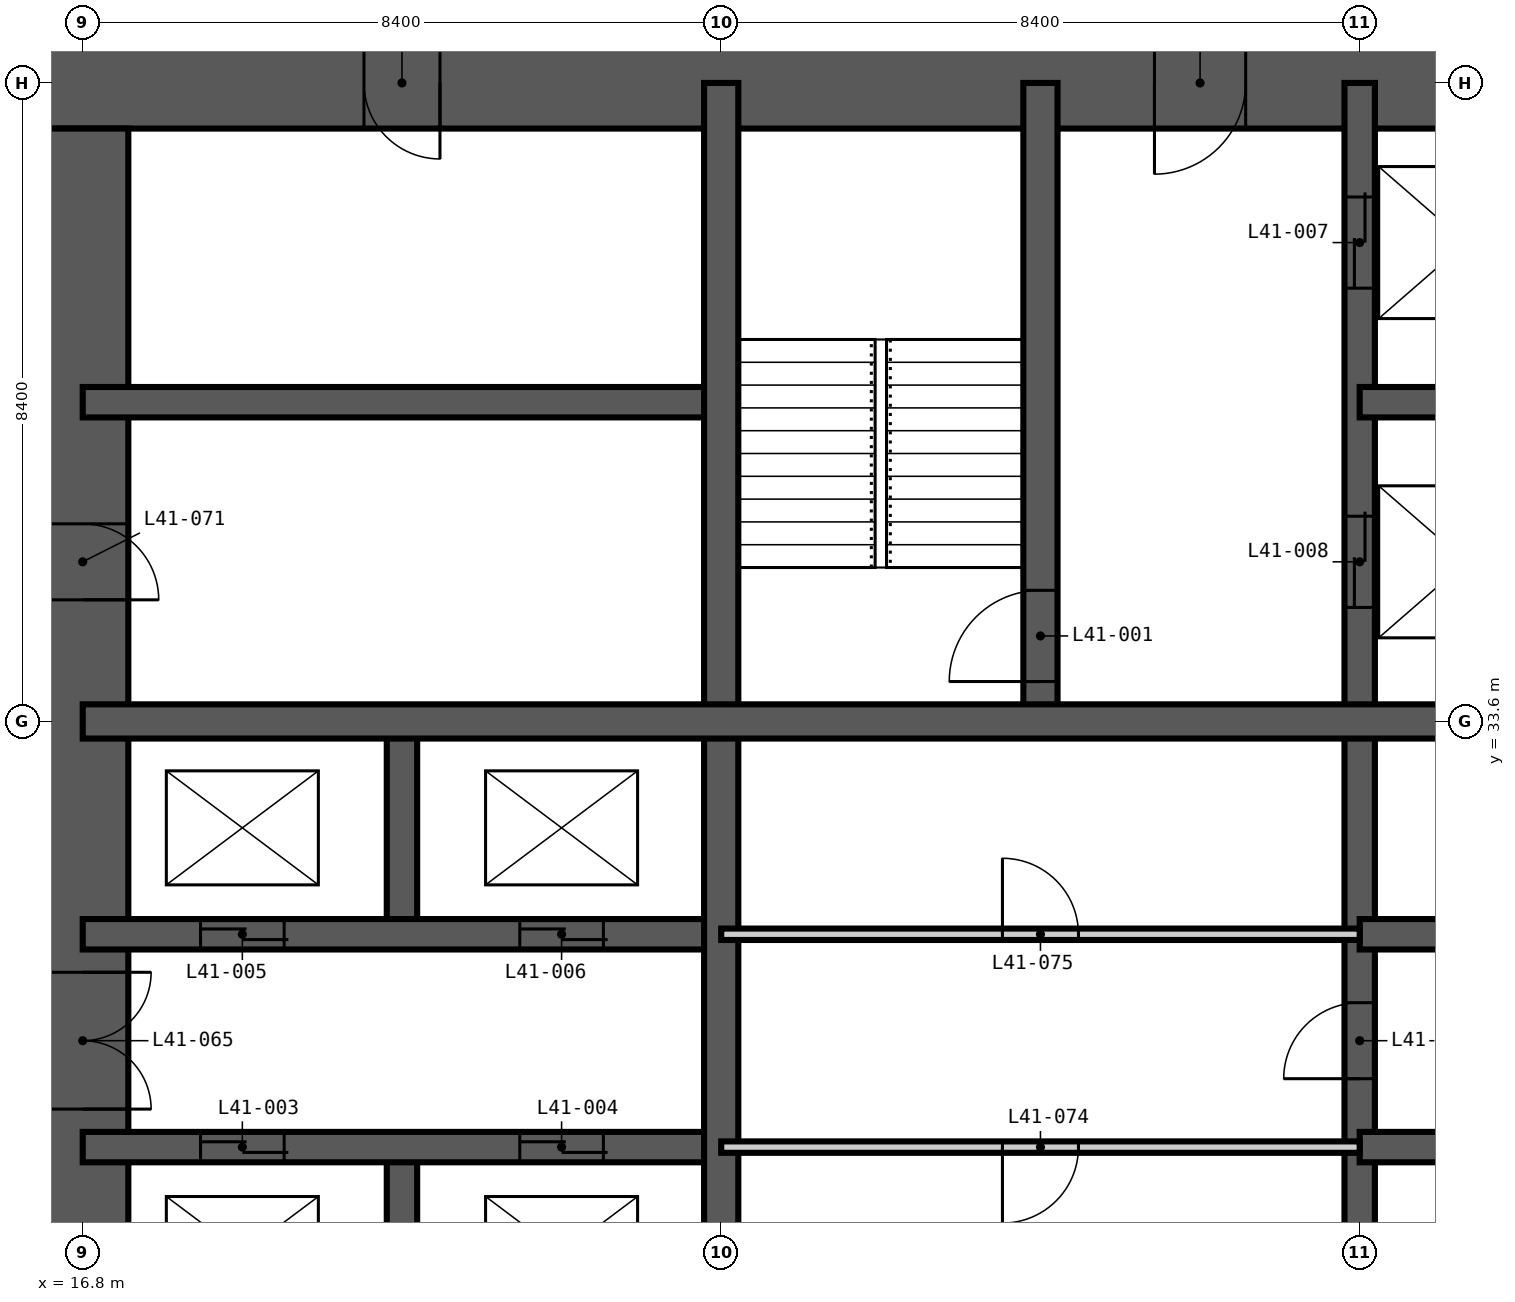
"""IFC4 building model, lengths in metres.
Left out: names, types, materials, properties, quantities, classifications, styles, units other than length and angle.
Written with IfcOpenShell. Run it as: python <this file> out.ifc"""

import sys

from ifc_helpers import new_model, si_unit, direction, frame, frame_2d, origin, place, context, subcontext, project, spatial, rectangle, extrude, element, fill, save


model = new_model("IFC4")
c1 = context("Model", 3, precision=1e-05, world=origin(), true_north=direction((0.0, 1.0)))
c2 = subcontext(c1, "Body", "Model", "MODEL_VIEW")
j1 = project(units=[si_unit("LENGTHUNIT", "METRE"), si_unit("PLANEANGLEUNIT", "RADIAN")], contexts=[c1])
p1 = place(None, origin())
s1 = spatial("IfcSite", under=j1, at=p1, CompositionType="ELEMENT")
p2 = place(p1, origin())
s2 = spatial("IfcBuilding", under=s1, at=p2, CompositionType="ELEMENT")
p3 = place(p2, frame((0.0, 0.0, 162.6)))
s3 = spatial("IfcBuildingStorey", under=s2, at=p3, CompositionType="ELEMENT", Elevation=162.6)
p4 = place(p3, frame((42.6, 42.0, -0.35), z_axis=(0.0, 0.0, 1.0), x_axis=(-1.0, 0.0, 0.0)))
e1 = element("IfcWall", 1, at=p4, inside=s3, PredefinedType="SHEAR", context=c2, shape_type="SweptSolid", body=[
    extrude(rectangle(XDim=26.4, YDim=1.2, at=frame_2d((13.2, 0.0))), origin(), (0.0, 0.0, 1.0), 3.6),
])
p5 = place(p4, frame((21.1, 0.0, 0.35)))
e2 = element("IfcOpeningElement", 2, at=p5, cuts=e1, PredefinedType="OPENING", context=c2, shape_type="SweptSolid", body=[
    extrude(rectangle(XDim=1.0, YDim=2.1, at=frame_2d((0.5, 1.05))), frame((0.0, 0.61, 0.0), z_axis=(0.0, -1.0, 0.0), x_axis=(1.0, 0.0, 0.0)), (0.0, 0.0, 1.0), 1.22),
])
p6 = place(p4, frame((10.5, 0.0, 0.35)))
e3 = element("IfcOpeningElement", 3, at=p6, cuts=e1, PredefinedType="OPENING", context=c2, shape_type="SweptSolid", body=[
    extrude(rectangle(XDim=1.2, YDim=2.2, at=frame_2d((0.6, 1.1))), frame((0.0, 0.61, 0.0), z_axis=(0.0, -1.0, 0.0), x_axis=(1.0, 0.0, 0.0)), (0.0, 0.0, 1.0), 1.22),
])
p7 = place(p3, frame((16.8, 41.4, -0.35), z_axis=(0.0, 0.0, 1.0), x_axis=(0.0, -1.0, 0.0)))
e4 = element("IfcWall", 4, at=p7, inside=s3, PredefinedType="SHEAR", context=c2, shape_type="SweptSolid", body=[
    extrude(rectangle(XDim=24.0, YDim=1.2, at=frame_2d((12.0, 0.0))), origin(), (0.0, 0.0, 1.0), 3.6),
])
p8 = place(p7, frame((11.1, 0.0, 0.35)))
e5 = element("IfcOpeningElement", 5, at=p8, cuts=e4, PredefinedType="OPENING", context=c2, shape_type="SweptSolid", body=[
    extrude(rectangle(XDim=1.8, YDim=2.2, at=frame_2d((0.9, 1.1))), frame((0.0, 0.61, 0.0), z_axis=(0.0, -1.0, 0.0), x_axis=(1.0, 0.0, 0.0)), (0.0, 0.0, 1.0), 1.22),
])
p9 = place(p7, frame((19.9, 0.0, 0.35)))
e6 = element("IfcOpeningElement", 6, at=p9, cuts=e4, PredefinedType="OPENING", context=c2, shape_type="SweptSolid", body=[
    extrude(rectangle(XDim=1.0, YDim=2.1, at=frame_2d((0.5, 1.05))), frame((0.0, 0.61, 0.0), z_axis=(0.0, -1.0, 0.0), x_axis=(1.0, 0.0, 0.0)), (0.0, 0.0, 1.0), 1.22),
])
p10 = place(p7, frame((5.2, 0.0, 0.35)))
e7 = element("IfcOpeningElement", 7, at=p10, cuts=e4, PredefinedType="OPENING", context=c2, shape_type="SweptSolid", body=[
    extrude(rectangle(XDim=1.0, YDim=2.1, at=frame_2d((0.5, 1.05))), frame((0.0, 0.61, 0.0), z_axis=(0.0, -1.0, 0.0), x_axis=(1.0, 0.0, 0.0)), (0.0, 0.0, 1.0), 1.22),
])
p11 = place(p3, frame((21.0, 22.4, -0.35), z_axis=(0.0, 0.0, 1.0), x_axis=(0.0, 1.0, 0.0)))
e8 = element("IfcWall", 8, at=p11, inside=s3, PredefinedType="SHEAR", context=c2, shape_type="SweptSolid", body=[
    extrude(rectangle(XDim=5.6, YDim=0.4, at=frame_2d((2.8, 0.0))), origin(), (0.0, 0.0, 1.0), 3.6),
])
p12 = place(p3, frame((21.0, 30.8, -0.35), z_axis=(0.0, 0.0, 1.0), x_axis=(0.0, 1.0, 0.0)))
e9 = element("IfcWall", 9, at=p12, inside=s3, PredefinedType="SHEAR", context=c2, shape_type="SweptSolid", body=[
    extrude(rectangle(XDim=2.8, YDim=0.4, at=frame_2d((1.4, 0.0))), origin(), (0.0, 0.0, 1.0), 3.6),
])
p13 = place(p3, frame((33.6, 16.8, -0.35), z_axis=(0.0, 0.0, 1.0), x_axis=(0.0, 1.0, 0.0)))
e10 = element("IfcWall", 10, at=p13, inside=s3, PredefinedType="SHEAR", context=c2, shape_type="SweptSolid", body=[
    extrude(rectangle(XDim=25.2, YDim=0.4, at=frame_2d((12.6, 0.0))), origin(), (0.0, 0.0, 1.0), 3.6),
])
p14 = place(p13, frame((22.5, 0.0, 0.35)))
e11 = element("IfcOpeningElement", 11, at=p14, cuts=e10, PredefinedType="OPENING", context=c2, shape_type="SweptSolid", body=[
    extrude(rectangle(XDim=1.2, YDim=2.2, at=frame_2d((0.6, 1.1))), frame((0.0, 0.21, 0.0), z_axis=(0.0, -1.0, 0.0), x_axis=(1.0, 0.0, 0.0)), (0.0, 0.0, 1.0), 0.42),
])
p15 = place(p13, frame((18.3, 0.0, 0.35)))
e12 = element("IfcOpeningElement", 12, at=p15, cuts=e10, PredefinedType="OPENING", context=c2, shape_type="SweptSolid", body=[
    extrude(rectangle(XDim=1.2, YDim=2.2, at=frame_2d((0.6, 1.1))), frame((0.0, 0.21, 0.0), z_axis=(0.0, -1.0, 0.0), x_axis=(1.0, 0.0, 0.0)), (0.0, 0.0, 1.0), 0.42),
])
p16 = place(p13, frame((12.1, 0.0, 0.35)))
e13 = element("IfcOpeningElement", 13, at=p16, cuts=e10, PredefinedType="OPENING", context=c2, shape_type="SweptSolid", body=[
    extrude(rectangle(XDim=1.0, YDim=2.1, at=frame_2d((0.5, 1.05))), frame((0.0, 0.21, 0.0), z_axis=(0.0, -1.0, 0.0), x_axis=(1.0, 0.0, 0.0)), (0.0, 0.0, 1.0), 0.42),
])
p17 = place(p3, frame((16.8, 28.0, -0.35), z_axis=(0.0, 0.0, 1.0), x_axis=(1.0, 0.0, 0.0)))
e14 = element("IfcWall", 14, at=p17, inside=s3, PredefinedType="SHEAR", context=c2, shape_type="SweptSolid", body=[
    extrude(rectangle(XDim=8.4, YDim=0.4, at=frame_2d((4.2, 0.0))), origin(), (0.0, 0.0, 1.0), 3.6),
])
p18 = place(p17, frame((1.55, 0.0, 0.35)))
e15 = element("IfcOpeningElement", 15, at=p18, cuts=e14, PredefinedType="OPENING", context=c2, shape_type="SweptSolid", body=[
    extrude(rectangle(XDim=1.1, YDim=2.2, at=frame_2d((0.55, 1.1))), frame((0.0, 0.21, 0.0), z_axis=(0.0, -1.0, 0.0), x_axis=(1.0, 0.0, 0.0)), (0.0, 0.0, 1.0), 0.42),
])
p19 = place(p17, frame((5.75, 0.0, 0.35)))
e16 = element("IfcOpeningElement", 16, at=p19, cuts=e14, PredefinedType="OPENING", context=c2, shape_type="SweptSolid", body=[
    extrude(rectangle(XDim=1.1, YDim=2.2, at=frame_2d((0.55, 1.1))), frame((0.0, 0.21, 0.0), z_axis=(0.0, -1.0, 0.0), x_axis=(1.0, 0.0, 0.0)), (0.0, 0.0, 1.0), 0.42),
])
p20 = place(p3, frame((33.6, 28.0, -0.35), z_axis=(0.0, 0.0, 1.0), x_axis=(1.0, 0.0, 0.0)))
e17 = element("IfcWall", 17, at=p20, inside=s3, PredefinedType="SHEAR", context=c2, shape_type="SweptSolid", body=[
    extrude(rectangle(XDim=8.4, YDim=0.4, at=frame_2d((4.2, 0.0))), origin(), (0.0, 0.0, 1.0), 3.6),
])
p21 = place(p20, frame((1.6, 0.0, 0.35)))
e18 = element("IfcOpeningElement", 18, at=p21, cuts=e17, PredefinedType="OPENING", context=c2, shape_type="SweptSolid", body=[
    extrude(rectangle(XDim=1.0, YDim=2.1, at=frame_2d((0.5, 1.05))), frame((0.0, 0.21, 0.0), z_axis=(0.0, -1.0, 0.0), x_axis=(1.0, 0.0, 0.0)), (0.0, 0.0, 1.0), 0.42),
])
p22 = place(p20, frame((4.6, 0.0, 0.35)))
e19 = element("IfcOpeningElement", 19, at=p22, cuts=e17, PredefinedType="OPENING", context=c2, shape_type="SweptSolid", body=[
    extrude(rectangle(XDim=1.0, YDim=2.1, at=frame_2d((0.5, 1.05))), frame((0.0, 0.21, 0.0), z_axis=(0.0, -1.0, 0.0), x_axis=(1.0, 0.0, 0.0)), (0.0, 0.0, 1.0), 0.42),
])
p23 = place(p3, frame((16.8, 30.8, -0.35), z_axis=(0.0, 0.0, 1.0), x_axis=(1.0, 0.0, 0.0)))
e20 = element("IfcWall", 20, at=p23, inside=s3, PredefinedType="SHEAR", context=c2, shape_type="SweptSolid", body=[
    extrude(rectangle(XDim=8.4, YDim=0.4, at=frame_2d((4.2, 0.0))), origin(), (0.0, 0.0, 1.0), 3.6),
])
p24 = place(p23, frame((1.55, 0.0, 0.35)))
e21 = element("IfcOpeningElement", 21, at=p24, cuts=e20, PredefinedType="OPENING", context=c2, shape_type="SweptSolid", body=[
    extrude(rectangle(XDim=1.1, YDim=2.2, at=frame_2d((0.55, 1.1))), frame((0.0, 0.21, 0.0), z_axis=(0.0, -1.0, 0.0), x_axis=(1.0, 0.0, 0.0)), (0.0, 0.0, 1.0), 0.42),
])
p25 = place(p23, frame((5.75, 0.0, 0.35)))
e22 = element("IfcOpeningElement", 22, at=p25, cuts=e20, PredefinedType="OPENING", context=c2, shape_type="SweptSolid", body=[
    extrude(rectangle(XDim=1.1, YDim=2.2, at=frame_2d((0.55, 1.1))), frame((0.0, 0.21, 0.0), z_axis=(0.0, -1.0, 0.0), x_axis=(1.0, 0.0, 0.0)), (0.0, 0.0, 1.0), 0.42),
])
for number, where, z_axis, x_axis in (
    (23, (33.6, 30.8, -0.35), (0.0, 0.0, 1.0), (1.0, 0.0, 0.0)),
    (24, (16.8, 37.8, -0.35), (0.0, 0.0, 1.0), (1.0, 0.0, 0.0)),
):
    element("IfcWall", number, at=place(p3, frame(where, z_axis=z_axis, x_axis=x_axis)), inside=s3, PredefinedType="SHEAR", context=c2, shape_type="SweptSolid", body=[
        extrude(rectangle(XDim=8.4, YDim=0.4, at=frame_2d((4.2, 0.0))), origin(), (0.0, 0.0, 1.0), 3.6),
    ])
p26 = place(p3, frame((33.6, 37.8, -0.35), z_axis=(0.0, 0.0, 1.0), x_axis=(1.0, 0.0, 0.0)))
e25 = element("IfcWall", 25, at=p26, inside=s3, PredefinedType="SHEAR", context=c2, shape_type="SweptSolid", body=[
    extrude(rectangle(XDim=2.8, YDim=0.4, at=frame_2d((1.4, 0.0))), origin(), (0.0, 0.0, 1.0), 3.6),
])
p27 = place(p3, frame((25.2, 16.8, -0.35), z_axis=(0.0, 0.0, 1.0), x_axis=(0.0, 1.0, 0.0)))
e26 = element("IfcWall", 26, at=p27, inside=s3, PredefinedType="SHEAR", context=c2, shape_type="SweptSolid", body=[
    extrude(rectangle(XDim=25.2, YDim=0.45, at=frame_2d((12.6, 0.0))), origin(), (0.0, 0.0, 1.0), 3.6),
])
p28 = place(p3, frame((29.4, 33.6, -0.35), z_axis=(0.0, 0.0, 1.0), x_axis=(0.0, 1.0, 0.0)))
e27 = element("IfcWall", 27, at=p28, inside=s3, PredefinedType="SHEAR", context=c2, shape_type="SweptSolid", body=[
    extrude(rectangle(XDim=8.4, YDim=0.45, at=frame_2d((4.2, 0.0))), origin(), (0.0, 0.0, 1.0), 3.6),
])
p29 = place(p28, frame((0.525, 0.0, 0.35)))
e28 = element("IfcOpeningElement", 28, at=p29, cuts=e27, PredefinedType="OPENING", context=c2, shape_type="SweptSolid", body=[
    extrude(rectangle(XDim=1.2, YDim=2.2, at=frame_2d((0.6, 1.1))), frame((0.0, 0.235, 0.0), z_axis=(0.0, -1.0, 0.0), x_axis=(1.0, 0.0, 0.0)), (0.0, 0.0, 1.0), 0.47),
])
p30 = place(p3, frame((16.8, 33.6, -0.35), z_axis=(0.0, 0.0, 1.0), x_axis=(1.0, 0.0, 0.0)))
e29 = element("IfcWall", 29, at=p30, inside=s3, PredefinedType="SHEAR", context=c2, shape_type="SweptSolid", body=[
    extrude(rectangle(XDim=25.2, YDim=0.45, at=frame_2d((12.6, 0.0))), origin(), (0.0, 0.0, 1.0), 3.6),
])
p31 = place(p3, frame((25.2, 28.0, 0.0), z_axis=(0.0, 0.0, 1.0), x_axis=(1.0, 0.0, 0.0)))
e30 = element("IfcWall", 30, at=p31, inside=s3, PredefinedType="PARTITIONING", context=c2, shape_type="SweptSolid", body=[
    extrude(rectangle(XDim=8.4, YDim=0.15, at=frame_2d((4.2, 0.0))), origin(), (0.0, 0.0, 1.0), 3.25),
])
p32 = place(p31, frame((3.7, 0.0, 0.0)))
e31 = element("IfcOpeningElement", 31, at=p32, cuts=e30, PredefinedType="OPENING", context=c2, shape_type="SweptSolid", body=[
    extrude(rectangle(XDim=1.0, YDim=2.1, at=frame_2d((0.5, 1.05))), frame((0.0, 0.085, 0.0), z_axis=(0.0, -1.0, 0.0), x_axis=(1.0, 0.0, 0.0)), (0.0, 0.0, 1.0), 0.17),
])
p33 = place(p3, frame((25.2, 30.8, 0.0), z_axis=(0.0, 0.0, 1.0), x_axis=(1.0, 0.0, 0.0)))
e32 = element("IfcWall", 32, at=p33, inside=s3, PredefinedType="PARTITIONING", context=c2, shape_type="SweptSolid", body=[
    extrude(rectangle(XDim=8.4, YDim=0.15, at=frame_2d((4.2, 0.0))), origin(), (0.0, 0.0, 1.0), 3.25),
])
p34 = place(p33, frame((3.7, 0.0, 0.0)))
e33 = element("IfcOpeningElement", 33, at=p34, cuts=e32, PredefinedType="OPENING", context=c2, shape_type="SweptSolid", body=[
    extrude(rectangle(XDim=1.0, YDim=2.1, at=frame_2d((0.5, 1.05))), frame((0.0, 0.085, 0.0), z_axis=(0.0, -1.0, 0.0), x_axis=(1.0, 0.0, 0.0)), (0.0, 0.0, 1.0), 0.17),
])
p35 = place(p29, origin())
e34 = element("IfcDoor", 34, at=p35, inside=s3, OperationType="SINGLE_SWING_LEFT", PredefinedType="DOOR", context=c2, shape_type="SweptSolid", body=[
    extrude(rectangle(XDim=1.2, YDim=2.2, at=frame_2d((0.6, 1.1))), frame((0.0, 0.025, 0.0), z_axis=(0.0, -1.0, 0.0), x_axis=(1.0, 0.0, 0.0)), (0.0, 0.0, 1.0), 0.05),
])
fill(e28, e34)
p36 = place(p18, origin())
e35 = element("IfcDoor", 35, at=p36, inside=s3, OperationType="DOUBLE_DOOR_SLIDING", PredefinedType="DOOR", context=c2, shape_type="SweptSolid", body=[
    extrude(rectangle(XDim=1.1, YDim=2.2, at=frame_2d((0.55, 1.1))), frame((0.0, 0.025, 0.0), z_axis=(0.0, -1.0, 0.0), x_axis=(1.0, 0.0, 0.0)), (0.0, 0.0, 1.0), 0.05),
])
fill(e15, e35)
p37 = place(p19, origin())
e36 = element("IfcDoor", 36, at=p37, inside=s3, OperationType="DOUBLE_DOOR_SLIDING", PredefinedType="DOOR", context=c2, shape_type="SweptSolid", body=[
    extrude(rectangle(XDim=1.1, YDim=2.2, at=frame_2d((0.55, 1.1))), frame((0.0, 0.025, 0.0), z_axis=(0.0, -1.0, 0.0), x_axis=(1.0, 0.0, 0.0)), (0.0, 0.0, 1.0), 0.05),
])
fill(e16, e36)
p38 = place(p24, origin())
e37 = element("IfcDoor", 37, at=p38, inside=s3, OperationType="DOUBLE_DOOR_SLIDING", PredefinedType="DOOR", context=c2, shape_type="SweptSolid", body=[
    extrude(rectangle(XDim=1.1, YDim=2.2, at=frame_2d((0.55, 1.1))), frame((0.0, 0.025, 0.0), z_axis=(0.0, -1.0, 0.0), x_axis=(1.0, 0.0, 0.0)), (0.0, 0.0, 1.0), 0.05),
])
fill(e21, e37)
p39 = place(p25, origin())
e38 = element("IfcDoor", 38, at=p39, inside=s3, OperationType="DOUBLE_DOOR_SLIDING", PredefinedType="DOOR", context=c2, shape_type="SweptSolid", body=[
    extrude(rectangle(XDim=1.1, YDim=2.2, at=frame_2d((0.55, 1.1))), frame((0.0, 0.025, 0.0), z_axis=(0.0, -1.0, 0.0), x_axis=(1.0, 0.0, 0.0)), (0.0, 0.0, 1.0), 0.05),
])
fill(e22, e38)
p40 = place(p14, origin())
e39 = element("IfcDoor", 39, at=p40, inside=s3, OperationType="DOUBLE_DOOR_SLIDING", PredefinedType="DOOR", context=c2, shape_type="SweptSolid", body=[
    extrude(rectangle(XDim=1.2, YDim=2.2, at=frame_2d((0.6, 1.1))), frame((0.0, 0.025, 0.0), z_axis=(0.0, -1.0, 0.0), x_axis=(1.0, 0.0, 0.0)), (0.0, 0.0, 1.0), 0.05),
])
fill(e11, e39)
p41 = place(p15, origin())
e40 = element("IfcDoor", 40, at=p41, inside=s3, OperationType="DOUBLE_DOOR_SLIDING", PredefinedType="DOOR", context=c2, shape_type="SweptSolid", body=[
    extrude(rectangle(XDim=1.2, YDim=2.2, at=frame_2d((0.6, 1.1))), frame((0.0, 0.025, 0.0), z_axis=(0.0, -1.0, 0.0), x_axis=(1.0, 0.0, 0.0)), (0.0, 0.0, 1.0), 0.05),
])
fill(e12, e40)
p42 = place(p8, origin())
e41 = element("IfcDoor", 41, at=p42, inside=s3, OperationType="DOUBLE_DOOR_DOUBLE_SWING", PredefinedType="DOOR", context=c2, shape_type="SweptSolid", body=[
    extrude(rectangle(XDim=1.8, YDim=2.2, at=frame_2d((0.9, 1.1))), frame((0.0, 0.025, 0.0), z_axis=(0.0, -1.0, 0.0), x_axis=(1.0, 0.0, 0.0)), (0.0, 0.0, 1.0), 0.05),
])
fill(e5, e41)
p43 = place(p10, origin())
e42 = element("IfcDoor", 42, at=p43, inside=s3, OperationType="SINGLE_SWING_RIGHT", PredefinedType="DOOR", context=c2, shape_type="SweptSolid", body=[
    extrude(rectangle(XDim=1.0, YDim=2.1, at=frame_2d((0.5, 1.05))), frame((0.0, 0.025, 0.0), z_axis=(0.0, -1.0, 0.0), x_axis=(1.0, 0.0, 0.0)), (0.0, 0.0, 1.0), 0.05),
])
fill(e7, e42)
p44 = place(p5, origin())
e43 = element("IfcDoor", 43, at=p44, inside=s3, OperationType="SINGLE_SWING_LEFT", PredefinedType="DOOR", context=c2, shape_type="SweptSolid", body=[
    extrude(rectangle(XDim=1.0, YDim=2.1, at=frame_2d((0.5, 1.05))), frame((0.0, 0.025, 0.0), z_axis=(0.0, -1.0, 0.0), x_axis=(1.0, 0.0, 0.0)), (0.0, 0.0, 1.0), 0.05),
])
fill(e2, e43)
p45 = place(p16, origin())
e44 = element("IfcDoor", 44, at=p45, inside=s3, OperationType="SINGLE_SWING_LEFT", PredefinedType="DOOR", context=c2, shape_type="SweptSolid", body=[
    extrude(rectangle(XDim=1.0, YDim=2.1, at=frame_2d((0.5, 1.05))), frame((0.0, 0.025, 0.0), z_axis=(0.0, -1.0, 0.0), x_axis=(1.0, 0.0, 0.0)), (0.0, 0.0, 1.0), 0.05),
])
fill(e13, e44)
p46 = place(p32, frame((1.0, 0.0, 0.0), z_axis=(0.0, 0.0, 1.0), x_axis=(-1.0, 0.0, 0.0)))
e45 = element("IfcDoor", 45, at=p46, inside=s3, OperationType="SINGLE_SWING_RIGHT", PredefinedType="DOOR", context=c2, shape_type="SweptSolid", body=[
    extrude(rectangle(XDim=1.0, YDim=2.1, at=frame_2d((0.5, 1.05))), frame((0.0, 0.025, 0.0), z_axis=(0.0, -1.0, 0.0), x_axis=(1.0, 0.0, 0.0)), (0.0, 0.0, 1.0), 0.05),
])
fill(e31, e45)
p47 = place(p34, origin())
e46 = element("IfcDoor", 46, at=p47, inside=s3, OperationType="SINGLE_SWING_LEFT", PredefinedType="DOOR", context=c2, shape_type="SweptSolid", body=[
    extrude(rectangle(XDim=1.0, YDim=2.1, at=frame_2d((0.5, 1.05))), frame((0.0, 0.025, 0.0), z_axis=(0.0, -1.0, 0.0), x_axis=(1.0, 0.0, 0.0)), (0.0, 0.0, 1.0), 0.05),
])
fill(e33, e46)
p48 = place(p6, origin())
e47 = element("IfcDoor", 47, at=p48, inside=s3, OperationType="SINGLE_SWING_RIGHT", PredefinedType="DOOR", context=c2, shape_type="SweptSolid", body=[
    extrude(rectangle(XDim=1.2, YDim=2.2, at=frame_2d((0.6, 1.1))), frame((0.0, 0.025, 0.0), z_axis=(0.0, -1.0, 0.0), x_axis=(1.0, 0.0, 0.0)), (0.0, 0.0, 1.0), 0.05),
])
fill(e3, e47)
save(model, sys.argv[1])
